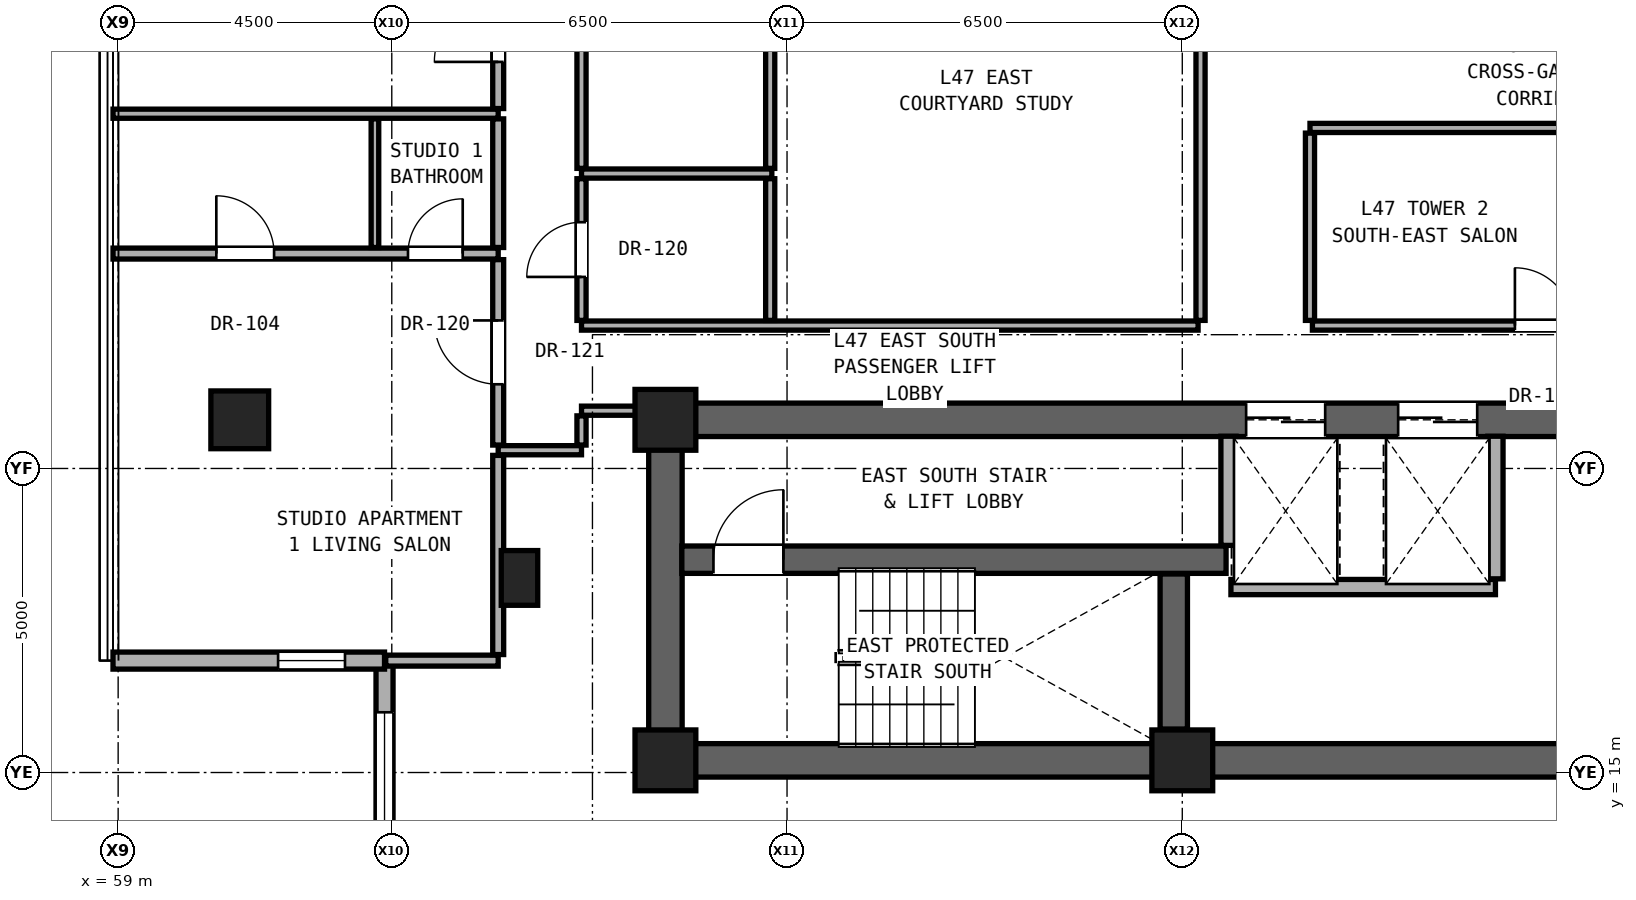
"""IFC4 building model, lengths in metres.
Left out: names, types, materials, properties, quantities, classifications, styles, units other than length and angle.
Written with IfcOpenShell. Run it as: python <this file> out.ifc"""

import sys

from ifc_helpers import new_model, si_unit, direction, frame, frame_2d, origin, origin_2d, place, context, subcontext, project, spatial, rectangle, hollow_rectangle, extrude, element, fill, save


model = new_model("IFC4")
c1 = context("Model", 3, precision=1e-05, world=origin(), true_north=direction((0.0, 1.0)))
c2 = subcontext(c1, "Body", "Model", "MODEL_VIEW")
j1 = project(units=[si_unit("LENGTHUNIT", "METRE"), si_unit("PLANEANGLEUNIT", "RADIAN")], contexts=[c1])
p1 = place(None, origin())
s1 = spatial("IfcSite", under=j1, at=p1, CompositionType="ELEMENT")
p2 = place(p1, origin())
s2 = spatial("IfcBuilding", under=s1, at=p2, CompositionType="ELEMENT")
p3 = place(p2, frame((0.0, 0.0, 167.4)))
s3 = spatial("IfcBuildingStorey", under=s2, at=p3, CompositionType="ELEMENT", Elevation=167.4)
for number, where, z_axis, x_axis in (
    (1, (68.0, 15.2, 0.0), (0.0, 0.0, 1.0), (1.0, 0.0, 0.0)),
    (2, (76.5, 15.2, 0.0), (0.0, 0.0, 1.0), (1.0, 0.0, 0.0)),
    (3, (68.0, 20.8, 0.0), (0.0, 0.0, 1.0), (1.0, 0.0, 0.0)),
):
    element("IfcColumn", number, at=place(p3, frame(where, z_axis=z_axis, x_axis=x_axis)), inside=s3, PredefinedType="COLUMN", context=c2, shape_type="SweptSolid", body=[
        extrude(rectangle(XDim=1.0, YDim=1.0, at=origin_2d()), origin(), (0.0, 0.0, 1.0), 3.25),
    ])
p4 = place(p3, frame((61.0, 20.8, 0.0), z_axis=(0.0, 0.0, 1.0), x_axis=(1.0, 0.0, 0.0)))
e4 = element("IfcColumn", 4, at=p4, inside=s3, PredefinedType="COLUMN", context=c2, shape_type="SweptSolid", body=[
    extrude(hollow_rectangle(XDim=0.95, YDim=0.95, WallThickness=0.05, at=origin_2d()), origin(), (0.0, 0.0, 1.0), 3.25),
])
p5 = place(p3, frame((65.6, 18.2, 0.0), z_axis=(0.0, 0.0, 1.0), x_axis=(1.0, 0.0, 0.0)))
e5 = element("IfcColumn", 5, at=p5, inside=s3, PredefinedType="PILASTER", context=c2, shape_type="SweptSolid", body=[
    extrude(rectangle(XDim=0.6, YDim=0.9, at=origin_2d()), origin(), (0.0, 0.0, 1.0), 3.25),
])
p6 = place(p3, frame((68.0, 15.2, 0.0), z_axis=(0.0, 0.0, 1.0), x_axis=(1.0, 0.0, 0.0)))
e6 = element("IfcWall", 6, at=p6, inside=s3, PredefinedType="SHEAR", context=c2, shape_type="SweptSolid", body=[
    extrude(rectangle(XDim=17.0, YDim=0.55, at=frame_2d((8.5, 0.0))), origin(), (0.0, 0.0, 1.0), 3.05),
])
p7 = place(p3, frame((68.0, 15.2, 0.0), z_axis=(0.0, 0.0, 1.0), x_axis=(0.0, 1.0, 0.0)))
e7 = element("IfcWall", 7, at=p7, inside=s3, PredefinedType="SHEAR", context=c2, shape_type="SweptSolid", body=[
    extrude(rectangle(XDim=5.6, YDim=0.55, at=frame_2d((2.8, 0.0))), origin(), (0.0, 0.0, 1.0), 3.05),
])
p8 = place(p3, frame((68.0, 20.8, 0.0), z_axis=(0.0, 0.0, 1.0), x_axis=(1.0, 0.0, 0.0)))
e8 = element("IfcWall", 8, at=p8, inside=s3, PredefinedType="SHEAR", context=c2, shape_type="SweptSolid", body=[
    extrude(rectangle(XDim=17.0, YDim=0.55, at=frame_2d((8.5, 0.0))), origin(), (0.0, 0.0, 1.0), 3.05),
])
p9 = place(p8, frame((9.55, 0.0, 0.0)))
e9 = element("IfcOpeningElement", 9, at=p9, cuts=e8, PredefinedType="OPENING", context=c2, shape_type="SweptSolid", body=[
    extrude(rectangle(XDim=1.3, YDim=2.3, at=frame_2d((0.65, 1.15))), frame((0.0, 0.285, 0.0), z_axis=(0.0, -1.0, 0.0), x_axis=(1.0, 0.0, 0.0)), (0.0, 0.0, 1.0), 0.57),
])
p10 = place(p8, frame((12.05, 0.0, 0.0)))
e10 = element("IfcOpeningElement", 10, at=p10, cuts=e8, PredefinedType="OPENING", context=c2, shape_type="SweptSolid", body=[
    extrude(rectangle(XDim=1.3, YDim=2.3, at=frame_2d((0.65, 1.15))), frame((0.0, 0.285, 0.0), z_axis=(0.0, -1.0, 0.0), x_axis=(1.0, 0.0, 0.0)), (0.0, 0.0, 1.0), 0.57),
])
p11 = place(p3, frame((63.381, 16.841, 0.0), z_axis=(0.0, 0.0, 1.0), x_axis=(0.0, -1.0, 0.0)))
e11 = element("IfcWall", 11, at=p11, inside=s3, PredefinedType="SOLIDWALL", context=c2, shape_type="SweptSolid", body=[
    extrude(rectangle(XDim=4.465, YDim=0.28, at=frame_2d((2.233, 0.0))), origin(), (0.0, 0.0, 1.0), 3.03),
])
p12 = place(p11, frame((0.85, 0.0, 0.53)))
e12 = element("IfcOpeningElement", 12, at=p12, cuts=e11, PredefinedType="OPENING", context=c2, shape_type="SweptSolid", body=[
    extrude(rectangle(XDim=2.4, YDim=2.35, at=frame_2d((1.2, 1.175))), frame((0.0, 0.15, 0.0), z_axis=(0.0, -1.0, 0.0), x_axis=(1.0, 0.0, 0.0)), (0.0, 0.0, 1.0), 0.3),
])
p13 = place(p3, frame((58.916, 16.841, 0.0), z_axis=(0.0, 0.0, 1.0), x_axis=(1.0, 0.0, 0.0)))
e13 = element("IfcWall", 13, at=p13, inside=s3, PredefinedType="SOLIDWALL", context=c2, shape_type="SweptSolid", body=[
    extrude(rectangle(XDim=4.465, YDim=0.28, at=frame_2d((2.232, 0.0))), origin(), (0.0, 0.0, 1.0), 3.03),
])
p14 = place(p13, frame((2.715, 0.0, 0.85)))
e14 = element("IfcOpeningElement", 14, at=p14, cuts=e13, PredefinedType="OPENING", context=c2, shape_type="SweptSolid", body=[
    extrude(rectangle(XDim=1.1, YDim=2.0, at=frame_2d((0.55, 1.0))), frame((0.0, 0.15, 0.0), z_axis=(0.0, -1.0, 0.0), x_axis=(1.0, 0.0, 0.0)), (0.0, 0.0, 1.0), 0.3),
])
p15 = place(p3, frame((63.401, 16.84, 0.0), z_axis=(0.0, 0.0, 1.0), x_axis=(1.0, 0.0, 0.0)))
e15 = element("IfcWall", 15, at=p15, inside=s3, PredefinedType="PARTITIONING", context=c2, shape_type="SweptSolid", body=[
    extrude(rectangle(XDim=1.849, YDim=0.18, at=frame_2d((0.925, 0.0))), origin(), (0.0, 0.0, 1.0), 3.05),
])
p16 = place(p3, frame((77.3, 18.05, 0.0), z_axis=(0.0, 0.0, 1.0), x_axis=(1.0, 0.0, 0.0)))
e16 = element("IfcWall", 16, at=p16, inside=s3, PredefinedType="SOLIDWALL", context=c2, shape_type="SweptSolid", body=[
    extrude(rectangle(XDim=4.35, YDim=0.25, at=frame_2d((2.175, 0.0))), origin(), (0.0, 0.0, 1.0), 3.05),
])
p17 = place(p3, frame((68.27, 18.5, 0.0), z_axis=(0.0, 0.0, 1.0), x_axis=(1.0, 0.0, 0.0)))
e17 = element("IfcWall", 17, at=p17, inside=s3, PredefinedType="SHEAR", context=c2, shape_type="SweptSolid", body=[
    extrude(rectangle(XDim=8.95, YDim=0.45, at=frame_2d((4.475, 0.0))), origin(), (0.0, 0.0, 1.0), 3.05),
])
p18 = place(p17, frame((0.52, 0.0, 0.0)))
e18 = element("IfcOpeningElement", 18, at=p18, cuts=e17, PredefinedType="OPENING", context=c2, shape_type="SweptSolid", body=[
    extrude(rectangle(XDim=1.15, YDim=2.2, at=frame_2d((0.575, 1.1))), frame((0.0, 0.235, 0.0), z_axis=(0.0, -1.0, 0.0), x_axis=(1.0, 0.0, 0.0)), (0.0, 0.0, 1.0), 0.47),
])
p19 = place(p3, frame((65.25, 20.3, 0.0), z_axis=(0.0, 0.0, 1.0), x_axis=(1.0, 0.0, 0.0)))
e19 = element("IfcWall", 19, at=p19, inside=s3, PredefinedType="PARTITIONING", context=c2, shape_type="SweptSolid", body=[
    extrude(rectangle(XDim=1.37, YDim=0.15, at=frame_2d((0.685, 0.0))), origin(), (0.0, 0.0, 1.0), 3.05),
])
p20 = place(p3, frame((66.62, 20.95, 0.0), z_axis=(0.0, 0.0, 1.0), x_axis=(1.0, 0.0, 0.0)))
e20 = element("IfcWall", 20, at=p20, inside=s3, PredefinedType="PARTITIONING", context=c2, shape_type="SweptSolid", body=[
    extrude(rectangle(XDim=1.11, YDim=0.15, at=frame_2d((0.555, 0.0))), origin(), (0.0, 0.0, 1.0), 2.442),
])
p21 = place(p3, frame((66.62, 22.35, 0.0), z_axis=(0.0, 0.0, 1.0), x_axis=(1.0, 0.0, 0.0)))
e21 = element("IfcWall", 21, at=p21, inside=s3, PredefinedType="PARTITIONING", context=c2, shape_type="SweptSolid", body=[
    extrude(rectangle(XDim=10.14, YDim=0.15, at=frame_2d((5.07, 0.0))), origin(), (0.0, 0.0, 1.0), 2.186),
])
p22 = place(p3, frame((78.64, 22.35, 0.0), z_axis=(0.0, 0.0, 1.0), x_axis=(1.0, 0.0, 0.0)))
e22 = element("IfcWall", 22, at=p22, inside=s3, PredefinedType="PARTITIONING", context=c2, shape_type="SweptSolid", body=[
    extrude(rectangle(XDim=7.61, YDim=0.15, at=frame_2d((3.805, 0.0))), origin(), (0.0, 0.0, 1.0), 2.186),
])
p23 = place(p22, frame((3.33, 0.0, 0.0)))
e23 = element("IfcOpeningElement", 23, at=p23, cuts=e22, PredefinedType="OPENING", context=c2, shape_type="SweptSolid", body=[
    extrude(rectangle(XDim=0.95, YDim=2.15, at=frame_2d((0.475, 1.075))), frame((0.0, 0.085, 0.0), z_axis=(0.0, -1.0, 0.0), x_axis=(1.0, 0.0, 0.0)), (0.0, 0.0, 1.0), 0.17),
])
p24 = place(p3, frame((58.916, 23.534, 0.0), z_axis=(0.0, 0.0, 1.0), x_axis=(1.0, 0.0, 0.0)))
e24 = element("IfcWall", 24, at=p24, inside=s3, PredefinedType="PARTITIONING", context=c2, shape_type="SweptSolid", body=[
    extrude(rectangle(XDim=6.334, YDim=0.18, at=frame_2d((3.167, 0.0))), origin(), (0.0, 0.0, 1.0), 2.269),
])
p25 = place(p24, frame((1.698, 0.0, 0.0)))
e25 = element("IfcOpeningElement", 25, at=p25, cuts=e24, PredefinedType="OPENING", context=c2, shape_type="SweptSolid", body=[
    extrude(rectangle(XDim=0.95, YDim=2.15, at=frame_2d((0.475, 1.075))), frame((0.0, 0.1, 0.0), z_axis=(0.0, -1.0, 0.0), x_axis=(1.0, 0.0, 0.0)), (0.0, 0.0, 1.0), 0.2),
])
p26 = place(p24, frame((4.851, 0.0, 0.0)))
e26 = element("IfcOpeningElement", 26, at=p26, cuts=e24, PredefinedType="OPENING", context=c2, shape_type="SweptSolid", body=[
    extrude(rectangle(XDim=0.9, YDim=2.1, at=frame_2d((0.45, 1.05))), frame((0.0, 0.1, 0.0), z_axis=(0.0, -1.0, 0.0), x_axis=(1.0, 0.0, 0.0)), (0.0, 0.0, 1.0), 0.2),
])
p27 = place(p3, frame((66.62, 24.85, 0.0), z_axis=(0.0, 0.0, 1.0), x_axis=(1.0, 0.0, 0.0)))
e27 = element("IfcWall", 27, at=p27, inside=s3, PredefinedType="PARTITIONING", context=c2, shape_type="SweptSolid", body=[
    extrude(rectangle(XDim=3.13, YDim=0.15, at=frame_2d((1.565, 0.0))), origin(), (0.0, 0.0, 1.0), 2.186),
])
p28 = place(p3, frame((78.6, 25.6, 0.0), z_axis=(0.0, 0.0, 1.0), x_axis=(1.0, 0.0, 0.0)))
e28 = element("IfcWall", 28, at=p28, inside=s3, PredefinedType="PARTITIONING", context=c2, shape_type="SweptSolid", body=[
    extrude(rectangle(XDim=7.65, YDim=0.15, at=frame_2d((3.825, 0.0))), origin(), (0.0, 0.0, 1.0), 2.186),
])
p29 = place(p3, frame((58.916, 25.834, 0.0), z_axis=(0.0, 0.0, 1.0), x_axis=(1.0, 0.0, 0.0)))
e29 = element("IfcWall", 29, at=p29, inside=s3, PredefinedType="PARTITIONING", context=c2, shape_type="SweptSolid", body=[
    extrude(rectangle(XDim=6.334, YDim=0.15, at=frame_2d((3.167, 0.0))), origin(), (0.0, 0.0, 1.0), 2.269),
])
p30 = place(p3, frame((63.223, 23.634, 0.0), z_axis=(0.0, 0.0, 1.0), x_axis=(0.0, 1.0, 0.0)))
e30 = element("IfcWall", 30, at=p30, inside=s3, PredefinedType="PARTITIONING", context=c2, shape_type="SweptSolid", body=[
    extrude(rectangle(XDim=2.115, YDim=0.125, at=frame_2d((1.058, 0.0))), origin(), (0.0, 0.0, 1.0), 3.05),
])
p31 = place(p3, frame((65.25, 16.94, 0.0), z_axis=(0.0, 0.0, 1.0), x_axis=(0.0, 1.0, 0.0)))
e31 = element("IfcWall", 31, at=p31, inside=s3, PredefinedType="PARTITIONING", context=c2, shape_type="SweptSolid", body=[
    extrude(rectangle(XDim=3.275, YDim=0.18, at=frame_2d((1.638, 0.0))), origin(), (0.0, 0.0, 1.0), 2.493),
])
p32 = place(p3, frame((65.25, 20.385, 0.0), z_axis=(0.0, 0.0, 1.0), x_axis=(0.0, 1.0, 0.0)))
e32 = element("IfcWall", 32, at=p32, inside=s3, PredefinedType="PARTITIONING", context=c2, shape_type="SweptSolid", body=[
    extrude(rectangle(XDim=3.049, YDim=0.18, at=frame_2d((1.524, 0.0))), origin(), (0.0, 0.0, 1.0), 2.442),
])
p33 = place(p32, frame((1.0, 0.0, 0.0)))
e33 = element("IfcOpeningElement", 33, at=p33, cuts=e32, PredefinedType="OPENING", context=c2, shape_type="SweptSolid", body=[
    extrude(rectangle(XDim=1.05, YDim=2.2, at=frame_2d((0.525, 1.1))), frame((0.0, 0.1, 0.0), z_axis=(0.0, -1.0, 0.0), x_axis=(1.0, 0.0, 0.0)), (0.0, 0.0, 1.0), 0.2),
])
p34 = place(p3, frame((65.25, 23.634, 0.0), z_axis=(0.0, 0.0, 1.0), x_axis=(0.0, 1.0, 0.0)))
e34 = element("IfcWall", 34, at=p34, inside=s3, PredefinedType="PARTITIONING", context=c2, shape_type="SweptSolid", body=[
    extrude(rectangle(XDim=2.115, YDim=0.18, at=frame_2d((1.058, 0.0))), origin(), (0.0, 0.0, 1.0), 3.05),
])
p35 = place(p3, frame((65.25, 25.919, 0.0), z_axis=(0.0, 0.0, 1.0), x_axis=(0.0, 1.0, 0.0)))
e35 = element("IfcWall", 35, at=p35, inside=s3, PredefinedType="PARTITIONING", context=c2, shape_type="SweptSolid", body=[
    extrude(rectangle(XDim=2.584, YDim=0.18, at=frame_2d((1.292, 0.0))), origin(), (0.0, 0.0, 1.0), 2.346),
])
p36 = place(p35, frame((0.767, 0.0, 0.0)))
e36 = element("IfcOpeningElement", 36, at=p36, cuts=e35, PredefinedType="OPENING", context=c2, shape_type="SweptSolid", body=[
    extrude(rectangle(XDim=1.05, YDim=2.2, at=frame_2d((0.525, 1.1))), frame((0.0, 0.1, 0.0), z_axis=(0.0, -1.0, 0.0), x_axis=(1.0, 0.0, 0.0)), (0.0, 0.0, 1.0), 0.2),
])
p37 = place(p3, frame((66.62, 20.385, 0.0), z_axis=(0.0, 0.0, 1.0), x_axis=(0.0, 1.0, 0.0)))
e37 = element("IfcWall", 37, at=p37, inside=s3, PredefinedType="PARTITIONING", context=c2, shape_type="SweptSolid", body=[
    extrude(rectangle(XDim=0.48, YDim=0.15, at=frame_2d((0.24, 0.0))), origin(), (0.0, 0.0, 1.0), 2.442),
])
p38 = place(p3, frame((66.62, 22.435, 0.0), z_axis=(0.0, 0.0, 1.0), x_axis=(0.0, 1.0, 0.0)))
e38 = element("IfcWall", 38, at=p38, inside=s3, PredefinedType="PARTITIONING", context=c2, shape_type="SweptSolid", body=[
    extrude(rectangle(XDim=2.33, YDim=0.15, at=frame_2d((1.165, 0.0))), origin(), (0.0, 0.0, 1.0), 3.05),
])
p39 = place(p38, frame((0.715, 0.0, 0.0)))
e39 = element("IfcOpeningElement", 39, at=p39, cuts=e38, PredefinedType="OPENING", context=c2, shape_type="SweptSolid", body=[
    extrude(rectangle(XDim=0.9, YDim=2.1, at=frame_2d((0.45, 1.05))), frame((0.0, 0.085, 0.0), z_axis=(0.0, -1.0, 0.0), x_axis=(1.0, 0.0, 0.0)), (0.0, 0.0, 1.0), 0.17),
])
p40 = place(p3, frame((66.62, 24.935, 0.0), z_axis=(0.0, 0.0, 1.0), x_axis=(0.0, 1.0, 0.0)))
e40 = element("IfcWall", 40, at=p40, inside=s3, PredefinedType="PARTITIONING", context=c2, shape_type="SweptSolid", body=[
    extrude(rectangle(XDim=5.63, YDim=0.15, at=frame_2d((2.815, 0.0))), origin(), (0.0, 0.0, 1.0), 2.346),
])
p41 = place(p40, frame((2.34, 0.0, 0.0)))
e41 = element("IfcOpeningElement", 41, at=p41, cuts=e40, PredefinedType="OPENING", context=c2, shape_type="SweptSolid", body=[
    extrude(rectangle(XDim=0.95, YDim=2.15, at=frame_2d((0.475, 1.075))), frame((0.0, 0.085, 0.0), z_axis=(0.0, -1.0, 0.0), x_axis=(1.0, 0.0, 0.0)), (0.0, 0.0, 1.0), 0.17),
])
p42 = place(p3, frame((69.723, 22.435, 0.0), z_axis=(0.0, 0.0, 1.0), x_axis=(0.0, 1.0, 0.0)))
e42 = element("IfcWall", 42, at=p42, inside=s3, PredefinedType="PARTITIONING", context=c2, shape_type="SweptSolid", body=[
    extrude(rectangle(XDim=2.33, YDim=0.15, at=frame_2d((1.165, 0.0))), origin(), (0.0, 0.0, 1.0), 3.05),
])
p43 = place(p3, frame((69.723, 24.935, 0.0), z_axis=(0.0, 0.0, 1.0), x_axis=(0.0, 1.0, 0.0)))
e43 = element("IfcWall", 43, at=p43, inside=s3, PredefinedType="PARTITIONING", context=c2, shape_type="SweptSolid", body=[
    extrude(rectangle(XDim=5.63, YDim=0.15, at=frame_2d((2.815, 0.0))), origin(), (0.0, 0.0, 1.0), 2.186),
])
p44 = place(p3, frame((76.36, 15.715, 0.0), z_axis=(0.0, 0.0, 1.0), x_axis=(0.0, 1.0, 0.0)))
e44 = element("IfcWall", 44, at=p44, inside=s3, PredefinedType="SHEAR", context=c2, shape_type="SweptSolid", body=[
    extrude(rectangle(XDim=2.55, YDim=0.45, at=frame_2d((1.275, 0.0))), origin(), (0.0, 0.0, 1.0), 3.05),
])
p45 = place(p3, frame((76.8, 22.435, 0.0), z_axis=(0.0, 0.0, 1.0), x_axis=(0.0, 1.0, 0.0)))
e45 = element("IfcWall", 45, at=p45, inside=s3, PredefinedType="PARTITIONING", context=c2, shape_type="SweptSolid", body=[
    extrude(rectangle(XDim=8.13, YDim=0.15, at=frame_2d((4.065, 0.0))), origin(), (0.0, 0.0, 1.0), 2.186),
])
p46 = place(p3, frame((77.26, 18.735, 0.0), z_axis=(0.0, 0.0, 1.0), x_axis=(0.0, 1.0, 0.0)))
e46 = element("IfcWall", 46, at=p46, inside=s3, PredefinedType="SOLIDWALL", context=c2, shape_type="SweptSolid", body=[
    extrude(rectangle(XDim=1.795, YDim=0.25, at=frame_2d((0.897, 0.0))), origin(), (0.0, 0.0, 1.0), 3.05),
])
p47 = place(p3, frame((78.6, 22.435, 0.0), z_axis=(0.0, 0.0, 1.0), x_axis=(0.0, 1.0, 0.0)))
e47 = element("IfcWall", 47, at=p47, inside=s3, PredefinedType="PARTITIONING", context=c2, shape_type="SweptSolid", body=[
    extrude(rectangle(XDim=3.08, YDim=0.15, at=frame_2d((1.54, 0.0))), origin(), (0.0, 0.0, 1.0), 3.05),
])
p48 = place(p3, frame((81.65, 18.185, 0.0), z_axis=(0.0, 0.0, 1.0), x_axis=(0.0, 1.0, 0.0)))
e48 = element("IfcWall", 48, at=p48, inside=s3, PredefinedType="SOLIDWALL", context=c2, shape_type="SweptSolid", body=[
    extrude(rectangle(XDim=2.345, YDim=0.25, at=frame_2d((1.172, 0.0))), origin(), (0.0, 0.0, 1.0), 3.05),
])
p49 = place(p12, origin())
e49 = element("IfcWindow", 49, at=p49, inside=s3, PartitioningType="SINGLE_PANEL", PredefinedType="WINDOW", context=c2, shape_type="SweptSolid", body=[
    extrude(rectangle(XDim=2.4, YDim=2.35, at=frame_2d((1.2, 1.175))), frame((0.0, 0.03, 0.0), z_axis=(0.0, -1.0, 0.0), x_axis=(1.0, 0.0, 0.0)), (0.0, 0.0, 1.0), 0.06),
])
fill(e12, e49)
p50 = place(p14, origin())
e50 = element("IfcWindow", 50, at=p50, inside=s3, PartitioningType="SINGLE_PANEL", PredefinedType="WINDOW", context=c2, shape_type="SweptSolid", body=[
    extrude(rectangle(XDim=1.1, YDim=2.0, at=frame_2d((0.55, 1.0))), frame((0.0, 0.03, 0.0), z_axis=(0.0, -1.0, 0.0), x_axis=(1.0, 0.0, 0.0)), (0.0, 0.0, 1.0), 0.06),
])
fill(e14, e50)
p51 = place(p18, origin())
e51 = element("IfcDoor", 51, at=p51, inside=s3, OperationType="SINGLE_SWING_RIGHT", PredefinedType="DOOR", context=c2, shape_type="SweptSolid", body=[
    extrude(rectangle(XDim=1.15, YDim=2.2, at=frame_2d((0.575, 1.1))), frame((0.0, 0.025, 0.0), z_axis=(0.0, -1.0, 0.0), x_axis=(1.0, 0.0, 0.0)), (0.0, 0.0, 1.0), 0.05),
])
fill(e18, e51)
p52 = place(p39, origin())
e52 = element("IfcDoor", 52, at=p52, inside=s3, OperationType="SINGLE_SWING_LEFT", PredefinedType="DOOR", context=c2, shape_type="SweptSolid", body=[
    extrude(rectangle(XDim=0.9, YDim=2.1, at=frame_2d((0.45, 1.05))), frame((0.0, 0.025, 0.0), z_axis=(0.0, -1.0, 0.0), x_axis=(1.0, 0.0, 0.0)), (0.0, 0.0, 1.0), 0.05),
])
fill(e39, e52)
p53 = place(p33, origin())
e53 = element("IfcDoor", 53, at=p53, inside=s3, OperationType="SINGLE_SWING_RIGHT", PredefinedType="DOOR", context=c2, shape_type="SweptSolid", body=[
    extrude(rectangle(XDim=1.05, YDim=2.2, at=frame_2d((0.525, 1.1))), frame((0.0, 0.025, 0.0), z_axis=(0.0, -1.0, 0.0), x_axis=(1.0, 0.0, 0.0)), (0.0, 0.0, 1.0), 0.05),
])
fill(e33, e53)
p54 = place(p25, origin())
e54 = element("IfcDoor", 54, at=p54, inside=s3, OperationType="SINGLE_SWING_LEFT", PredefinedType="DOOR", context=c2, shape_type="SweptSolid", body=[
    extrude(rectangle(XDim=0.95, YDim=2.15, at=frame_2d((0.475, 1.075))), frame((0.0, 0.025, 0.0), z_axis=(0.0, -1.0, 0.0), x_axis=(1.0, 0.0, 0.0)), (0.0, 0.0, 1.0), 0.05),
])
fill(e25, e54)
p55 = place(p26, origin())
e55 = element("IfcDoor", 55, at=p55, inside=s3, OperationType="SINGLE_SWING_RIGHT", PredefinedType="DOOR", context=c2, shape_type="SweptSolid", body=[
    extrude(rectangle(XDim=0.9, YDim=2.1, at=frame_2d((0.45, 1.05))), frame((0.0, 0.025, 0.0), z_axis=(0.0, -1.0, 0.0), x_axis=(1.0, 0.0, 0.0)), (0.0, 0.0, 1.0), 0.05),
])
fill(e26, e55)
p56 = place(p36, origin())
e56 = element("IfcDoor", 56, at=p56, inside=s3, OperationType="SINGLE_SWING_LEFT", PredefinedType="DOOR", context=c2, shape_type="SweptSolid", body=[
    extrude(rectangle(XDim=1.05, YDim=2.2, at=frame_2d((0.525, 1.1))), frame((0.0, 0.025, 0.0), z_axis=(0.0, -1.0, 0.0), x_axis=(1.0, 0.0, 0.0)), (0.0, 0.0, 1.0), 0.05),
])
fill(e36, e56)
p57 = place(p23, origin())
e57 = element("IfcDoor", 57, at=p57, inside=s3, OperationType="SINGLE_SWING_LEFT", PredefinedType="DOOR", context=c2, shape_type="SweptSolid", body=[
    extrude(rectangle(XDim=0.95, YDim=2.15, at=frame_2d((0.475, 1.075))), frame((0.0, 0.025, 0.0), z_axis=(0.0, -1.0, 0.0), x_axis=(1.0, 0.0, 0.0)), (0.0, 0.0, 1.0), 0.05),
])
fill(e23, e57)
p58 = place(p9, origin())
e58 = element("IfcDoor", 58, at=p58, inside=s3, OperationType="DOUBLE_DOOR_SLIDING", PredefinedType="DOOR", context=c2, shape_type="SweptSolid", body=[
    extrude(rectangle(XDim=1.3, YDim=2.3, at=frame_2d((0.65, 1.15))), frame((0.0, 0.025, 0.0), z_axis=(0.0, -1.0, 0.0), x_axis=(1.0, 0.0, 0.0)), (0.0, 0.0, 1.0), 0.05),
])
fill(e9, e58)
p59 = place(p10, origin())
e59 = element("IfcDoor", 59, at=p59, inside=s3, OperationType="DOUBLE_DOOR_SLIDING", PredefinedType="DOOR", context=c2, shape_type="SweptSolid", body=[
    extrude(rectangle(XDim=1.3, YDim=2.3, at=frame_2d((0.65, 1.15))), frame((0.0, 0.025, 0.0), z_axis=(0.0, -1.0, 0.0), x_axis=(1.0, 0.0, 0.0)), (0.0, 0.0, 1.0), 0.05),
])
fill(e10, e59)
save(model, sys.argv[1])
